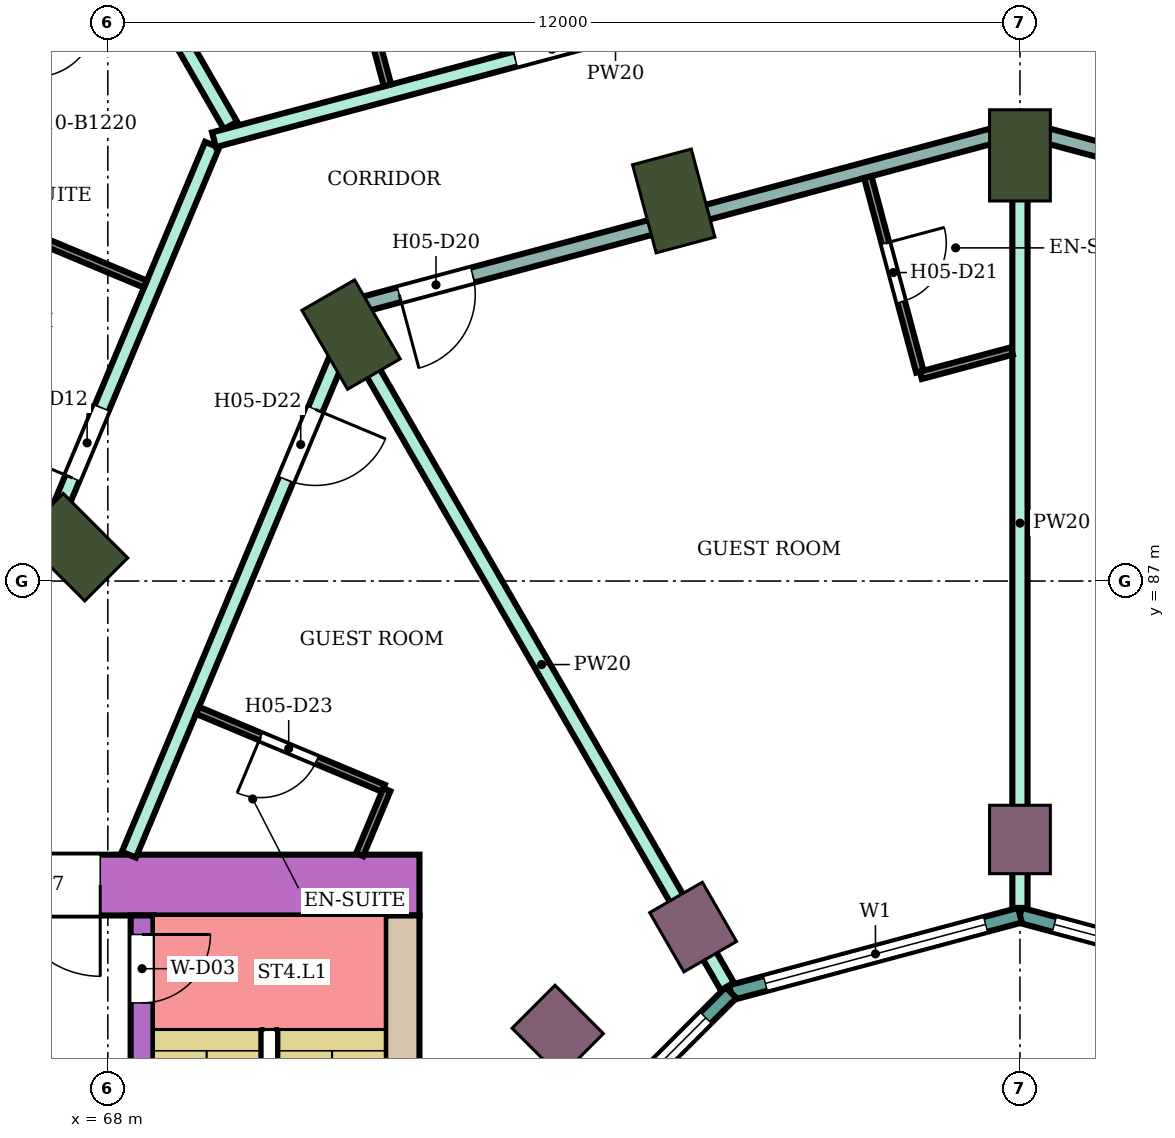
"""IFC4 building model, lengths in metres.
Left out: names, types, materials, properties, quantities, classifications, styles, units other than length and angle.
Written with IfcOpenShell. Run it as: python <this file> out.ifc"""

import sys

from ifc_helpers import new_model, si_unit, direction, frame, frame_2d, origin, origin_2d, place, context, subcontext, project, spatial, rectangle, extrude, element, fill, save


model = new_model("IFC4")
c1 = context("Model", 3, precision=1e-05, world=origin(), true_north=direction((0.0, 1.0)))
c2 = subcontext(c1, "Body", "Model", "MODEL_VIEW")
j1 = project(units=[si_unit("LENGTHUNIT", "METRE"), si_unit("PLANEANGLEUNIT", "RADIAN")], contexts=[c1])
p1 = place(None, origin())
s1 = spatial("IfcSite", under=j1, at=p1, CompositionType="ELEMENT")
p2 = place(p1, origin())
s2 = spatial("IfcBuilding", under=s1, at=p2, CompositionType="ELEMENT")
p3 = place(p2, frame((0.0, 0.0, 82.4)))
s3 = spatial("IfcBuildingStorey", under=s2, at=p3, CompositionType="ELEMENT", Elevation=82.4)
for number, where, z_axis, x_axis in (
    (1, (80.0, 92.6, 0.0), (0.0, 0.0, 1.0), (0.0, 1.0, 0.0)),
    (2, (75.445, 92.0, 0.0), (0.0, 0.0, 1.0), (-0.259, 0.966, 0.0)),
    (3, (71.2, 90.242, 0.0), (0.0, 0.0, 1.0), (-0.5, 0.866, 0.0)),
    (4, (67.555, 87.445, 0.0), (0.0, 0.0, 1.0), (-0.707, 0.707, 0.0)),
):
    element("IfcColumn", number, at=place(p3, frame(where, z_axis=z_axis, x_axis=x_axis)), inside=s3, PredefinedType="COLUMN", context=c2, shape_type="SweptSolid", body=[
        extrude(rectangle(XDim=1.2, YDim=0.8, at=origin_2d()), origin(), (0.0, 0.0, 1.0), 3.8),
    ])
for number, where, z_axis, x_axis in (
    (5, (80.0, 83.6, 0.0), (0.0, 0.0, 1.0), (0.0, 1.0, 0.0)),
    (6, (75.7, 82.448, 0.0), (0.0, 0.0, 1.0), (-0.5, 0.866, 0.0)),
    (7, (73.919, 81.081, 0.0), (0.0, 0.0, 1.0), (-0.707, 0.707, 0.0)),
):
    element("IfcColumn", number, at=place(p3, frame(where, z_axis=z_axis, x_axis=x_axis)), inside=s3, PredefinedType="COLUMN", context=c2, shape_type="SweptSolid", body=[
        extrude(rectangle(XDim=0.9, YDim=0.8, at=origin_2d()), origin(), (0.0, 0.0, 1.0), 3.8),
    ])
p4 = place(p3, frame((72.1, 83.0, 0.0), z_axis=(0.0, 0.0, 1.0), x_axis=(-1.0, 0.0, 0.0)))
e8 = element("IfcWall", 8, at=p4, inside=s3, PredefinedType="SHEAR", context=c2, shape_type="SweptSolid", body=[
    extrude(rectangle(XDim=14.7, YDim=0.8, at=frame_2d((7.35, 0.0))), origin(), (0.0, 0.0, 1.0), 3.48),
])
p5 = place(p4, frame((4.2, 0.0, 0.0)))
e9 = element("IfcOpeningElement", 9, at=p5, cuts=e8, PredefinedType="OPENING", context=c2, shape_type="SweptSolid", body=[
    extrude(rectangle(XDim=2.4, YDim=2.4, at=frame_2d((1.2, 1.2))), frame((0.0, 0.41, 0.0), z_axis=(0.0, -1.0, 0.0), x_axis=(1.0, 0.0, 0.0)), (0.0, 0.0, 1.0), 0.82),
])
p6 = place(p3, frame((71.875, 82.6, 0.0), z_axis=(0.0, 0.0, 1.0), x_axis=(0.0, -1.0, 0.0)))
e10 = element("IfcWall", 10, at=p6, inside=s3, PredefinedType="SHEAR", context=c2, shape_type="SweptSolid", body=[
    extrude(rectangle(XDim=7.6, YDim=0.45, at=frame_2d((3.8, 0.0))), origin(), (0.0, 0.0, 1.0), 3.48),
])
p7 = place(p3, frame((68.45, 82.6, 0.0), z_axis=(0.0, 0.0, 1.0), x_axis=(0.0, -1.0, 0.0)))
e11 = element("IfcWall", 11, at=p7, inside=s3, PredefinedType="SHEAR", context=c2, shape_type="SweptSolid", body=[
    extrude(rectangle(XDim=7.6, YDim=0.3, at=frame_2d((3.8, 0.0))), origin(), (0.0, 0.0, 1.0), 3.48),
])
p8 = place(p7, frame((0.25, 0.0, 0.0)))
e12 = element("IfcOpeningElement", 12, at=p8, cuts=e11, PredefinedType="OPENING", context=c2, shape_type="SweptSolid", body=[
    extrude(rectangle(XDim=0.9, YDim=2.1, at=frame_2d((0.45, 1.05))), frame((0.0, 0.16, 0.0), z_axis=(0.0, -1.0, 0.0), x_axis=(1.0, 0.0, 0.0)), (0.0, 0.0, 1.0), 0.32),
])
p9 = place(p3, frame((83.802, 81.585, 0.0), z_axis=(0.0, 0.0, 1.0), x_axis=(-0.965933654434, 0.258789828301, 0.0)))
e13 = element("IfcWall", 13, at=p9, inside=s3, PredefinedType="NOTDEFINED", context=c2, shape_type="SweptSolid", body=[
    extrude(rectangle(XDim=3.936, YDim=0.2, at=frame_2d((1.968, 0.0))), origin(), (0.0, 0.0, 1.0), 3.8),
])
p10 = place(p9, frame((0.468, 0.0, 0.9)))
e14 = element("IfcOpeningElement", 14, at=p10, cuts=e13, PredefinedType="OPENING", context=c2, shape_type="SweptSolid", body=[
    extrude(rectangle(XDim=3.0, YDim=2.3, at=frame_2d((1.5, 1.15))), frame((0.0, 0.11, 0.0), z_axis=(0.0, -1.0, 0.0), x_axis=(1.0, 0.0, 0.0)), (0.0, 0.0, 1.0), 0.22),
])
p11 = place(p3, frame((80.0, 82.604, 0.0), z_axis=(0.0, 0.0, 1.0), x_axis=(-0.965933654434, -0.258789828301, 0.0)))
e15 = element("IfcWall", 15, at=p11, inside=s3, PredefinedType="NOTDEFINED", context=c2, shape_type="SweptSolid", body=[
    extrude(rectangle(XDim=3.936, YDim=0.2, at=frame_2d((1.968, 0.0))), origin(), (0.0, 0.0, 1.0), 3.8),
])
p12 = place(p11, frame((0.468, 0.0, 0.9)))
e16 = element("IfcOpeningElement", 16, at=p12, cuts=e15, PredefinedType="OPENING", context=c2, shape_type="SweptSolid", body=[
    extrude(rectangle(XDim=3.0, YDim=2.3, at=frame_2d((1.5, 1.15))), frame((0.0, 0.11, 0.0), z_axis=(0.0, -1.0, 0.0), x_axis=(1.0, 0.0, 0.0)), (0.0, 0.0, 1.0), 0.22),
])
p13 = place(p3, frame((76.198, 81.585, 0.0), z_axis=(0.0, 0.0, 1.0), x_axis=(-0.707106781187, -0.707106781187, 0.0)))
e17 = element("IfcWall", 17, at=p13, inside=s3, PredefinedType="NOTDEFINED", context=c2, shape_type="SweptSolid", body=[
    extrude(rectangle(XDim=3.936, YDim=0.2, at=frame_2d((1.968, 0.0))), origin(), (0.0, 0.0, 1.0), 3.8),
])
p14 = place(p13, frame((0.468, 0.0, 0.9)))
e18 = element("IfcOpeningElement", 18, at=p14, cuts=e17, PredefinedType="OPENING", context=c2, shape_type="SweptSolid", body=[
    extrude(rectangle(XDim=3.0, YDim=2.3, at=frame_2d((1.5, 1.15))), frame((0.0, 0.11, 0.0), z_axis=(0.0, -1.0, 0.0), x_axis=(1.0, 0.0, 0.0)), (0.0, 0.0, 1.0), 0.22),
])
p15 = place(p3, frame((66.085, 84.9, 0.0), z_axis=(0.0, 0.0, 1.0), x_axis=(0.386676248006, 0.922215527536, 0.0)))
e19 = element("IfcWall", 19, at=p15, inside=s3, PredefinedType="PARTITIONING", context=c2, shape_type="SweptSolid", body=[
    extrude(rectangle(XDim=8.5, YDim=0.2, at=frame_2d((4.25, 0.0))), origin(), (0.0, 0.0, 1.0), 3.35),
])
p16 = place(p15, frame((3.748, 0.0, 0.0)))
e20 = element("IfcOpeningElement", 20, at=p16, cuts=e19, PredefinedType="OPENING", context=c2, shape_type="SweptSolid", body=[
    extrude(rectangle(XDim=1.0, YDim=2.1, at=frame_2d((0.5, 1.05))), frame((0.0, 0.11, 0.0), z_axis=(0.0, -1.0, 0.0), x_axis=(1.0, 0.0, 0.0)), (0.0, 0.0, 1.0), 0.22),
])
p17 = place(p3, frame((67.104, 97.343, 0.0), z_axis=(0.0, 0.0, 1.0), x_axis=(0.499799615385, -0.866141064989, 0.0)))
e21 = element("IfcWall", 21, at=p17, inside=s3, PredefinedType="PARTITIONING", context=c2, shape_type="SweptSolid", body=[
    extrude(rectangle(XDim=5.021, YDim=0.2, at=frame_2d((2.511, 0.0))), origin(), (0.0, 0.0, 1.0), 3.35),
])
p18 = place(p3, frame((68.277, 83.4, 0.0), z_axis=(0.0, 0.0, 1.0), x_axis=(0.386454861164, 0.922308321703, 0.0)))
e22 = element("IfcWall", 22, at=p18, inside=s3, PredefinedType="PARTITIONING", context=c2, shape_type="SweptSolid", body=[
    extrude(rectangle(XDim=7.762, YDim=0.2, at=frame_2d((3.881, 0.0))), origin(), (0.0, 0.0, 1.0), 3.35),
])
p19 = place(p18, frame((5.351, 0.0, 0.0)))
e23 = element("IfcOpeningElement", 23, at=p19, cuts=e22, PredefinedType="OPENING", context=c2, shape_type="SweptSolid", body=[
    extrude(rectangle(XDim=1.0, YDim=2.1, at=frame_2d((0.5, 1.05))), frame((0.0, 0.11, 0.0), z_axis=(0.0, -1.0, 0.0), x_axis=(1.0, 0.0, 0.0)), (0.0, 0.0, 1.0), 0.22),
])
p20 = place(p3, frame((69.397, 92.805, 0.0), z_axis=(0.0, 0.0, 1.0), x_axis=(0.96596468683, 0.258673972015, 0.0)))
e24 = element("IfcWall", 24, at=p20, inside=s3, PredefinedType="PARTITIONING", context=c2, shape_type="SweptSolid", body=[
    extrude(rectangle(XDim=10.937, YDim=0.2, at=frame_2d((5.469, 0.0))), origin(), (0.0, 0.0, 1.0), 3.35),
])
p21 = place(p20, frame((6.163, 0.0, 0.0)))
e25 = element("IfcOpeningElement", 25, at=p21, cuts=e24, PredefinedType="OPENING", context=c2, shape_type="SweptSolid", body=[
    extrude(rectangle(XDim=1.0, YDim=2.1, at=frame_2d((0.5, 1.05))), frame((0.0, 0.11, 0.0), z_axis=(0.0, -1.0, 0.0), x_axis=(1.0, 0.0, 0.0)), (0.0, 0.0, 1.0), 0.22),
])
p22 = place(p20, frame((4.103, 0.0, 0.0)))
e26 = element("IfcOpeningElement", 26, at=p22, cuts=e24, PredefinedType="OPENING", context=c2, shape_type="SweptSolid", body=[
    extrude(rectangle(XDim=1.0, YDim=2.1, at=frame_2d((0.5, 1.05))), frame((0.0, 0.11, 0.0), z_axis=(0.0, -1.0, 0.0), x_axis=(1.0, 0.0, 0.0)), (0.0, 0.0, 1.0), 0.22),
])
p23 = place(p3, frame((71.264, 90.135, 0.0), z_axis=(0.0, 0.0, 1.0), x_axis=(0.499791624077, -0.866145676259, 0.0)))
e27 = element("IfcWall", 27, at=p23, inside=s3, PredefinedType="PARTITIONING", context=c2, shape_type="SweptSolid", body=[
    extrude(rectangle(XDim=9.778, YDim=0.2, at=frame_2d((4.889, 0.0))), origin(), (0.0, 0.0, 1.0), 3.35),
])
p24 = place(p3, frame((71.303, 90.625, 0.0), z_axis=(0.0, 0.0, 1.0), x_axis=(0.965971868307, 0.258647152776, 0.0)))
e28 = element("IfcWall", 28, at=p24, inside=s3, PredefinedType="PARTITIONING", context=c2, shape_type="SweptSolid", body=[
    extrude(rectangle(XDim=8.874, YDim=0.2, at=frame_2d((4.437, 0.0))), origin(), (0.0, 0.0, 1.0), 2.98),
])
p25 = place(p24, frame((0.55, 0.0, 0.0)))
e29 = element("IfcOpeningElement", 29, at=p25, cuts=e28, PredefinedType="OPENING", context=c2, shape_type="SweptSolid", body=[
    extrude(rectangle(XDim=1.0, YDim=2.1, at=frame_2d((0.5, 1.05))), frame((0.0, 0.11, 0.0), z_axis=(0.0, -1.0, 0.0), x_axis=(1.0, 0.0, 0.0)), (0.0, 0.0, 1.0), 0.22),
])
p26 = place(p3, frame((80.0, 82.699, 0.0), z_axis=(0.0, 0.0, 1.0), x_axis=(0.0, 1.0, 0.0)))
e30 = element("IfcWall", 30, at=p26, inside=s3, PredefinedType="PARTITIONING", context=c2, shape_type="SweptSolid", body=[
    extrude(rectangle(XDim=10.125, YDim=0.2, at=frame_2d((5.062, 0.0))), origin(), (0.0, 0.0, 1.0), 3.35),
])
p27 = place(p3, frame((80.0, 92.954, 0.0), z_axis=(0.0, 0.0, 1.0), x_axis=(0.965932194462, -0.258795277586, 0.0)))
e31 = element("IfcWall", 31, at=p27, inside=s3, PredefinedType="PARTITIONING", context=c2, shape_type="SweptSolid", body=[
    extrude(rectangle(XDim=8.934, YDim=0.2, at=frame_2d((4.467, 0.0))), origin(), (0.0, 0.0, 1.0), 2.98),
])
p28 = place(p27, frame((3.302, 0.0, 0.0)))
e32 = element("IfcOpeningElement", 32, at=p28, cuts=e31, PredefinedType="OPENING", context=c2, shape_type="SweptSolid", body=[
    extrude(rectangle(XDim=0.9, YDim=2.1, at=frame_2d((0.45, 1.05))), frame((0.0, 0.11, 0.0), z_axis=(0.0, -1.0, 0.0), x_axis=(1.0, 0.0, 0.0)), (0.0, 0.0, 1.0), 0.22),
])
p29 = place(p3, frame((80.0, 95.648, 0.0), z_axis=(0.0, 0.0, 1.0), x_axis=(0.965852259202, -0.259093445292, 0.0)))
e33 = element("IfcWall", 33, at=p29, inside=s3, PredefinedType="PARTITIONING", context=c2, shape_type="SweptSolid", body=[
    extrude(rectangle(XDim=10.597, YDim=0.2, at=frame_2d((5.298, 0.0))), origin(), (0.0, 0.0, 1.0), 3.35),
])
p30 = place(p29, frame((5.875, 0.0, 0.0)))
e34 = element("IfcOpeningElement", 34, at=p30, cuts=e33, PredefinedType="OPENING", context=c2, shape_type="SweptSolid", body=[
    extrude(rectangle(XDim=1.0, YDim=2.1, at=frame_2d((0.5, 1.05))), frame((0.0, 0.11, 0.0), z_axis=(0.0, -1.0, 0.0), x_axis=(1.0, 0.0, 0.0)), (0.0, 0.0, 1.0), 0.22),
])
p31 = place(p3, frame((66.023, 91.996, 0.0), z_axis=(0.0, 0.0, 1.0), x_axis=(0.386497426192, 0.922290485447, 0.0)))
e35 = element("IfcWall", 35, at=p31, inside=s3, PredefinedType="PARTITIONING", context=c2, shape_type="SweptSolid", body=[
    extrude(rectangle(XDim=4.383, YDim=0.1, at=frame_2d((2.191, 0.0))), origin(), (0.0, 0.0, 1.0), 2.58),
])
p32 = place(p31, frame((1.841, 0.0, 0.0)))
e36 = element("IfcOpeningElement", 36, at=p32, cuts=e35, PredefinedType="OPENING", context=c2, shape_type="SweptSolid", body=[
    extrude(rectangle(XDim=0.8, YDim=2.1, at=frame_2d((0.4, 1.05))), frame((0.0, 0.06, 0.0), z_axis=(0.0, -1.0, 0.0), x_axis=(1.0, 0.0, 0.0)), (0.0, 0.0, 1.0), 0.12),
])
p33 = place(p3, frame((66.003, 91.95, 0.0), z_axis=(0.0, 0.0, 1.0), x_axis=(0.922350337209, -0.386354572188, 0.0)))
e37 = element("IfcWall", 37, at=p33, inside=s3, PredefinedType="PARTITIONING", context=c2, shape_type="SweptSolid", body=[
    extrude(rectangle(XDim=2.7, YDim=0.1, at=frame_2d((1.35, 0.0))), origin(), (0.0, 0.0, 1.0), 3.35),
])
p34 = place(p3, frame((69.181, 85.298, 0.0), z_axis=(0.0, 0.0, 1.0), x_axis=(0.922377635784, -0.38628939541, 0.0)))
e38 = element("IfcWall", 38, at=p34, inside=s3, PredefinedType="PARTITIONING", context=c2, shape_type="SweptSolid", body=[
    extrude(rectangle(XDim=2.65, YDim=0.1, at=frame_2d((1.325, 0.0))), origin(), (0.0, 0.0, 1.0), 3.35),
])
p35 = place(p34, frame((0.9, 0.0, 0.0)))
e39 = element("IfcOpeningElement", 39, at=p35, cuts=e38, PredefinedType="OPENING", context=c2, shape_type="SweptSolid", body=[
    extrude(rectangle(XDim=0.8, YDim=2.1, at=frame_2d((0.4, 1.05))), frame((0.0, 0.06, 0.0), z_axis=(0.0, -1.0, 0.0), x_axis=(1.0, 0.0, 0.0)), (0.0, 0.0, 1.0), 0.12),
])
p36 = place(p3, frame((70.981, 96.128, 0.0), z_axis=(0.0, 0.0, 1.0), x_axis=(0.25867580527, -0.965964195904, 0.0)))
e40 = element("IfcWall", 40, at=p36, inside=s3, PredefinedType="PARTITIONING", context=c2, shape_type="SweptSolid", body=[
    extrude(rectangle(XDim=2.699, YDim=0.1, at=frame_2d((1.35, 0.0))), origin(), (0.0, 0.0, 1.0), 3.35),
])
p37 = place(p3, frame((71.313, 83.4, 0.0), z_axis=(0.0, 0.0, 1.0), x_axis=(0.386148512695, 0.922436624459, 0.0)))
e41 = element("IfcWall", 41, at=p37, inside=s3, PredefinedType="PARTITIONING", context=c2, shape_type="SweptSolid", body=[
    extrude(rectangle(XDim=0.927, YDim=0.1, at=frame_2d((0.463, 0.0))), origin(), (0.0, 0.0, 1.0), 3.35),
])
p38 = place(p3, frame((77.998, 92.314, 0.0), z_axis=(0.0, 0.0, 1.0), x_axis=(0.258608674509, -0.965982170368, 0.0)))
e42 = element("IfcWall", 42, at=p38, inside=s3, PredefinedType="PARTITIONING", context=c2, shape_type="SweptSolid", body=[
    extrude(rectangle(XDim=2.65, YDim=0.1, at=frame_2d((1.325, 0.0))), origin(), (0.0, 0.0, 1.0), 3.35),
])
p39 = place(p38, frame((0.9, 0.0, 0.0)))
e43 = element("IfcOpeningElement", 43, at=p39, cuts=e42, PredefinedType="OPENING", context=c2, shape_type="SweptSolid", body=[
    extrude(rectangle(XDim=0.8, YDim=2.1, at=frame_2d((0.4, 1.05))), frame((0.0, 0.06, 0.0), z_axis=(0.0, -1.0, 0.0), x_axis=(1.0, 0.0, 0.0)), (0.0, 0.0, 1.0), 0.12),
])
p40 = place(p3, frame((78.696, 89.706, 0.0), z_axis=(0.0, 0.0, 1.0), x_axis=(0.966002513606, 0.258532674351, 0.0)))
e44 = element("IfcWall", 44, at=p40, inside=s3, PredefinedType="PARTITIONING", context=c2, shape_type="SweptSolid", body=[
    extrude(rectangle(XDim=1.24, YDim=0.1, at=frame_2d((0.62, 0.0))), origin(), (0.0, 0.0, 1.0), 3.35),
])
p41 = place(p10, origin())
e45 = element("IfcWindow", 45, at=p41, inside=s3, PartitioningType="SINGLE_PANEL", PredefinedType="WINDOW", context=c2, shape_type="SweptSolid", body=[
    extrude(rectangle(XDim=3.0, YDim=2.3, at=frame_2d((1.5, 1.15))), frame((0.0, 0.03, 0.0), z_axis=(0.0, -1.0, 0.0), x_axis=(1.0, 0.0, 0.0)), (0.0, 0.0, 1.0), 0.06),
])
fill(e14, e45)
p42 = place(p12, origin())
e46 = element("IfcWindow", 46, at=p42, inside=s3, PartitioningType="SINGLE_PANEL", PredefinedType="WINDOW", context=c2, shape_type="SweptSolid", body=[
    extrude(rectangle(XDim=3.0, YDim=2.3, at=frame_2d((1.5, 1.15))), frame((0.0, 0.03, 0.0), z_axis=(0.0, -1.0, 0.0), x_axis=(1.0, 0.0, 0.0)), (0.0, 0.0, 1.0), 0.06),
])
fill(e16, e46)
p43 = place(p14, origin())
e47 = element("IfcWindow", 47, at=p43, inside=s3, PartitioningType="SINGLE_PANEL", PredefinedType="WINDOW", context=c2, shape_type="SweptSolid", body=[
    extrude(rectangle(XDim=3.0, YDim=2.3, at=frame_2d((1.5, 1.15))), frame((0.0, 0.03, 0.0), z_axis=(0.0, -1.0, 0.0), x_axis=(1.0, 0.0, 0.0)), (0.0, 0.0, 1.0), 0.06),
])
fill(e18, e47)
p44 = place(p22, origin())
e48 = element("IfcDoor", 48, at=p44, inside=s3, OperationType="SINGLE_SWING_RIGHT", PredefinedType="DOOR", context=c2, shape_type="SweptSolid", body=[
    extrude(rectangle(XDim=1.0, YDim=2.1, at=frame_2d((0.5, 1.05))), frame((0.0, 0.025, 0.0), z_axis=(0.0, -1.0, 0.0), x_axis=(1.0, 0.0, 0.0)), (0.0, 0.0, 1.0), 0.05),
])
fill(e26, e48)
p45 = place(p16, origin())
e49 = element("IfcDoor", 49, at=p45, inside=s3, OperationType="SINGLE_SWING_LEFT", PredefinedType="DOOR", context=c2, shape_type="SweptSolid", body=[
    extrude(rectangle(XDim=1.0, YDim=2.1, at=frame_2d((0.5, 1.05))), frame((0.0, 0.025, 0.0), z_axis=(0.0, -1.0, 0.0), x_axis=(1.0, 0.0, 0.0)), (0.0, 0.0, 1.0), 0.05),
])
fill(e20, e49)
p46 = place(p25, frame((1.0, 0.0, 0.0), z_axis=(0.0, 0.0, 1.0), x_axis=(-1.0, 0.0, 0.0)))
e50 = element("IfcDoor", 50, at=p46, inside=s3, OperationType="SINGLE_SWING_RIGHT", PredefinedType="DOOR", context=c2, shape_type="SweptSolid", body=[
    extrude(rectangle(XDim=1.0, YDim=2.1, at=frame_2d((0.5, 1.05))), frame((0.0, 0.025, 0.0), z_axis=(0.0, -1.0, 0.0), x_axis=(1.0, 0.0, 0.0)), (0.0, 0.0, 1.0), 0.05),
])
fill(e29, e50)
p47 = place(p39, origin())
e51 = element("IfcDoor", 51, at=p47, inside=s3, OperationType="SINGLE_SWING_LEFT", PredefinedType="DOOR", context=c2, shape_type="SweptSolid", body=[
    extrude(rectangle(XDim=0.8, YDim=2.1, at=frame_2d((0.4, 1.05))), frame((0.0, 0.025, 0.0), z_axis=(0.0, -1.0, 0.0), x_axis=(1.0, 0.0, 0.0)), (0.0, 0.0, 1.0), 0.05),
])
fill(e43, e51)
p48 = place(p19, frame((1.0, 0.0, 0.0), z_axis=(0.0, 0.0, 1.0), x_axis=(-1.0, 0.0, 0.0)))
e52 = element("IfcDoor", 52, at=p48, inside=s3, OperationType="SINGLE_SWING_LEFT", PredefinedType="DOOR", context=c2, shape_type="SweptSolid", body=[
    extrude(rectangle(XDim=1.0, YDim=2.1, at=frame_2d((0.5, 1.05))), frame((0.0, 0.025, 0.0), z_axis=(0.0, -1.0, 0.0), x_axis=(1.0, 0.0, 0.0)), (0.0, 0.0, 1.0), 0.05),
])
fill(e23, e52)
p49 = place(p35, frame((0.8, 0.0, 0.0), z_axis=(0.0, 0.0, 1.0), x_axis=(-1.0, 0.0, 0.0)))
e53 = element("IfcDoor", 53, at=p49, inside=s3, OperationType="SINGLE_SWING_RIGHT", PredefinedType="DOOR", context=c2, shape_type="SweptSolid", body=[
    extrude(rectangle(XDim=0.8, YDim=2.1, at=frame_2d((0.4, 1.05))), frame((0.0, 0.025, 0.0), z_axis=(0.0, -1.0, 0.0), x_axis=(1.0, 0.0, 0.0)), (0.0, 0.0, 1.0), 0.05),
])
fill(e39, e53)
p50 = place(p8, origin())
e54 = element("IfcDoor", 54, at=p50, inside=s3, OperationType="SINGLE_SWING_LEFT", PredefinedType="DOOR", context=c2, shape_type="SweptSolid", body=[
    extrude(rectangle(XDim=0.9, YDim=2.1, at=frame_2d((0.45, 1.05))), frame((0.0, 0.025, 0.0), z_axis=(0.0, -1.0, 0.0), x_axis=(1.0, 0.0, 0.0)), (0.0, 0.0, 1.0), 0.05),
])
fill(e12, e54)
p51 = place(p5, origin())
e55 = element("IfcDoor", 55, at=p51, inside=s3, OperationType="DOUBLE_DOOR_SINGLE_SWING", PredefinedType="DOOR", context=c2, shape_type="SweptSolid", body=[
    extrude(rectangle(XDim=2.4, YDim=2.4, at=frame_2d((1.2, 1.2))), frame((0.0, 0.025, 0.0), z_axis=(0.0, -1.0, 0.0), x_axis=(1.0, 0.0, 0.0)), (0.0, 0.0, 1.0), 0.05),
])
fill(e9, e55)
save(model, sys.argv[1])
